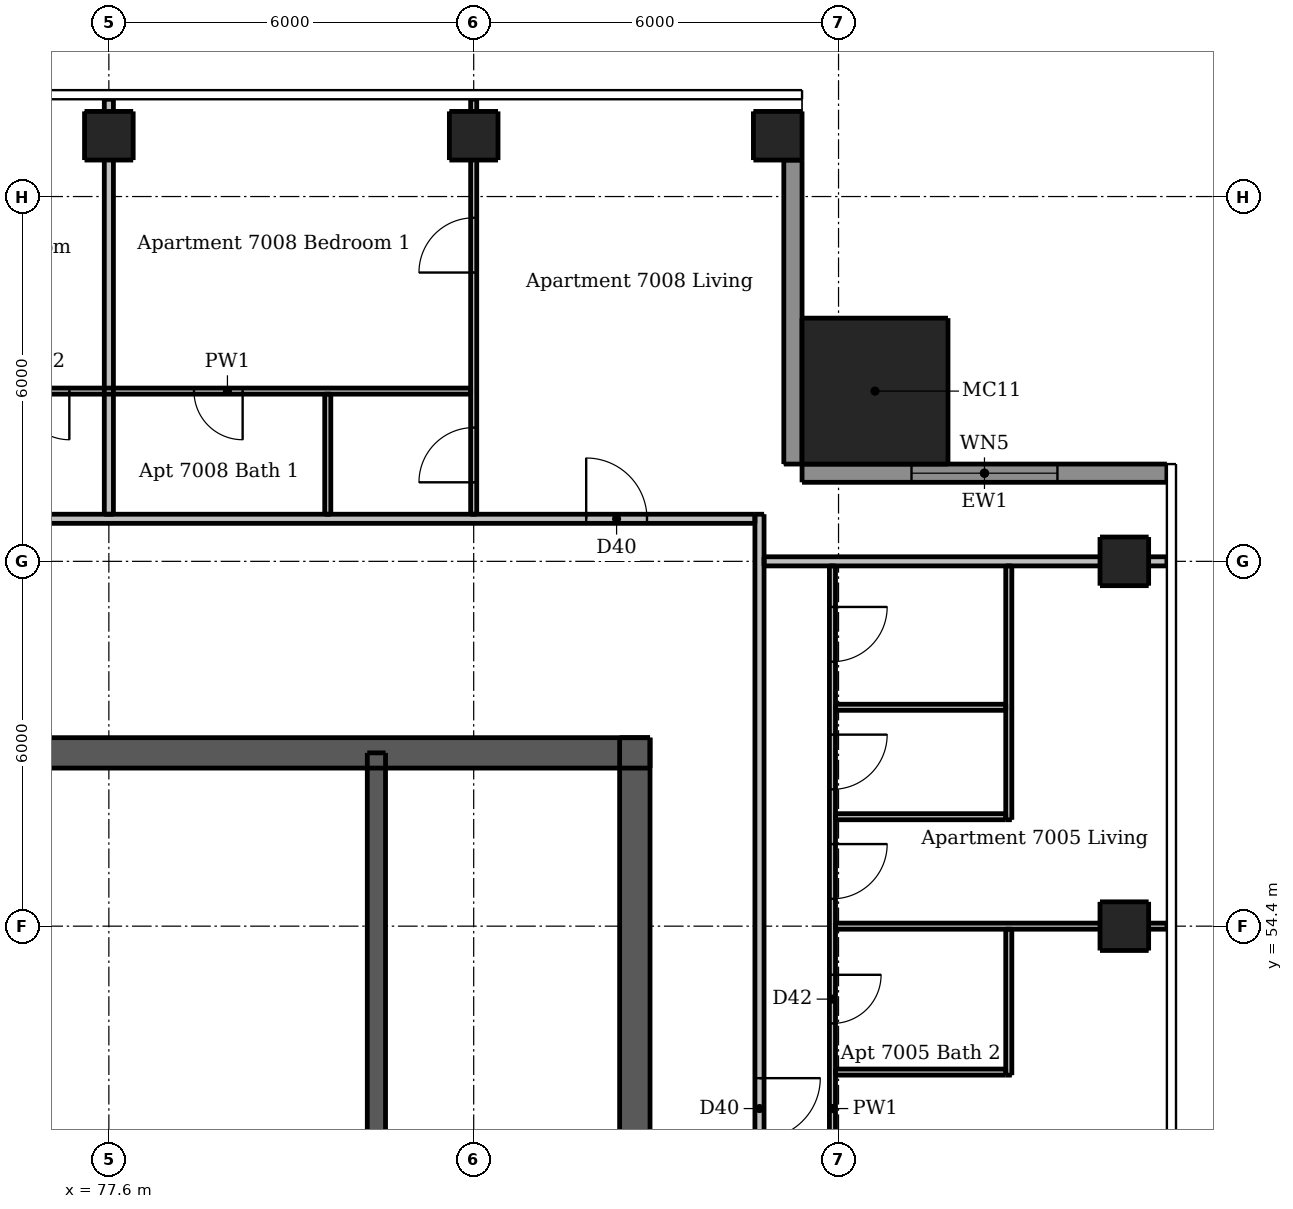
"""IFC4 building model, lengths in metres.
Left out: names, types, materials, properties, quantities, classifications, styles, units other than length and angle.
Written with IfcOpenShell. Run it as: python <this file> out.ifc"""

import sys

from ifc_helpers import new_model, si_unit, direction, frame, frame_2d, origin, origin_2d, place, context, subcontext, project, spatial, rectangle, extrude, element, fill, save


model = new_model("IFC4")
c1 = context("Model", 3, precision=1e-05, world=origin(), true_north=direction((0.0, 1.0)))
c2 = subcontext(c1, "Body", "Model", "MODEL_VIEW")
j1 = project(units=[si_unit("LENGTHUNIT", "METRE"), si_unit("PLANEANGLEUNIT", "RADIAN")], contexts=[c1])
p1 = place(None, origin())
s1 = spatial("IfcSite", under=j1, at=p1, CompositionType="ELEMENT")
p2 = place(p1, origin())
s2 = spatial("IfcBuilding", under=s1, at=p2, CompositionType="ELEMENT")
p3 = place(p2, frame((0.0, 0.0, 262.0)))
s3 = spatial("IfcBuildingStorey", under=s2, at=p3, CompositionType="ELEMENT", Elevation=262.0)
p4 = place(p3, frame((62.5, 57.25, 0.0), z_axis=(0.0, 0.0, 1.0), x_axis=(1.0, 0.0, 0.0)))
e1 = element("IfcWall", 1, at=p4, inside=s3, PredefinedType="SHEAR", context=c2, shape_type="SweptSolid", body=[
    extrude(rectangle(XDim=24.0, YDim=0.5, at=frame_2d((12.0, 0.0))), origin(), (0.0, 0.0, 1.0), 3.05),
])
p5 = place(p4, frame((21.025, 0.0, 0.0)))
e2 = element("IfcOpeningElement", 2, at=p5, cuts=e1, PredefinedType="OPENING", context=c2, shape_type="SweptSolid", body=[
    extrude(rectangle(XDim=1.1, YDim=2.1, at=frame_2d((0.55, 1.05))), frame((0.0, 0.26, 0.0), z_axis=(0.0, -1.0, 0.0), x_axis=(1.0, 0.0, 0.0)), (0.0, 0.0, 1.0), 0.52),
])
p6 = place(p4, frame((1.875, 0.0, 0.0)))
e3 = element("IfcOpeningElement", 3, at=p6, cuts=e1, PredefinedType="OPENING", context=c2, shape_type="SweptSolid", body=[
    extrude(rectangle(XDim=1.1, YDim=2.1, at=frame_2d((0.55, 1.05))), frame((0.0, 0.26, 0.0), z_axis=(0.0, -1.0, 0.0), x_axis=(1.0, 0.0, 0.0)), (0.0, 0.0, 1.0), 0.52),
])
p7 = place(p4, frame((11.55, 0.0, 0.0)))
e4 = element("IfcOpeningElement", 4, at=p7, cuts=e1, PredefinedType="OPENING", context=c2, shape_type="SweptSolid", body=[
    extrude(rectangle(XDim=0.9, YDim=2.1, at=frame_2d((0.45, 1.05))), frame((0.0, 0.26, 0.0), z_axis=(0.0, -1.0, 0.0), x_axis=(1.0, 0.0, 0.0)), (0.0, 0.0, 1.0), 0.52),
])
p8 = place(p3, frame((86.25, 33.5, 0.0), z_axis=(0.0, 0.0, 1.0), x_axis=(0.0, 1.0, 0.0)))
e5 = element("IfcWall", 5, at=p8, inside=s3, PredefinedType="SHEAR", context=c2, shape_type="SweptSolid", body=[
    extrude(rectangle(XDim=24.0, YDim=0.5, at=frame_2d((12.0, 0.0))), origin(), (0.0, 0.0, 1.0), 3.05),
])
p9 = place(p8, frame((11.2, 0.0, 0.0)))
e6 = element("IfcOpeningElement", 6, at=p9, cuts=e5, PredefinedType="OPENING", context=c2, shape_type="SweptSolid", body=[
    extrude(rectangle(XDim=1.6, YDim=2.1, at=frame_2d((0.8, 1.05))), frame((0.0, 0.26, 0.0), z_axis=(0.0, -1.0, 0.0), x_axis=(1.0, 0.0, 0.0)), (0.0, 0.0, 1.0), 0.52),
])
p10 = place(p3, frame((82.0, 47.1, 0.0), z_axis=(0.0, 0.0, 1.0), x_axis=(0.0, 1.0, 0.0)))
e7 = element("IfcWall", 7, at=p10, inside=s3, PredefinedType="SHEAR", context=c2, shape_type="SweptSolid", body=[
    extrude(rectangle(XDim=10.15, YDim=0.3, at=frame_2d((5.075, 0.0))), origin(), (0.0, 0.0, 1.0), 3.05),
])
for number, where, z_axis, x_axis in (
    (8, (94.3, 54.4, 0.0), (0.0, 0.0, 1.0), (1.0, 0.0, 0.0)),
    (9, (94.3, 60.4, 0.0), (0.0, 0.0, 1.0), (1.0, 0.0, 0.0)),
    (10, (77.6, 67.4, 0.0), (0.0, 0.0, 1.0), (1.0, 0.0, 0.0)),
    (11, (83.6, 67.4, 0.0), (0.0, 0.0, 1.0), (1.0, 0.0, 0.0)),
    (12, (88.6, 67.4, 0.0), (0.0, 0.0, 1.0), (1.0, 0.0, 0.0)),
):
    element("IfcColumn", number, at=place(p3, frame(where, z_axis=z_axis, x_axis=x_axis)), inside=s3, PredefinedType="COLUMN", context=c2, shape_type="SweptSolid", body=[
        extrude(rectangle(XDim=0.8, YDim=0.8, at=origin_2d()), origin(), (0.0, 0.0, 1.0), 3.05),
    ])
p11 = place(p3, frame((90.2, 63.2, 0.0), z_axis=(0.0, 0.0, 1.0), x_axis=(1.0, 0.0, 0.0)))
e13 = element("IfcColumn", 13, at=p11, inside=s3, PredefinedType="COLUMN", context=c2, shape_type="SweptSolid", body=[
    extrude(rectangle(XDim=2.4, YDim=2.4, at=origin_2d()), origin(), (0.0, 0.0, 1.0), 3.3),
])
p12 = place(p3, frame((95.0, 61.85, 0.0), z_axis=(0.0, 0.0, 1.0), x_axis=(-1.0, 0.0, 0.0)))
e14 = element("IfcWall", 14, at=p12, inside=s3, PredefinedType="SOLIDWALL", context=c2, shape_type="SweptSolid", body=[
    extrude(rectangle(XDim=6.0, YDim=0.3, at=frame_2d((3.0, 0.0))), origin(), (0.0, 0.0, 1.0), 3.05),
])
p13 = place(p12, frame((1.8, 0.0, 0.15)))
e15 = element("IfcOpeningElement", 15, at=p13, cuts=e14, PredefinedType="OPENING", context=c2, shape_type="SweptSolid", body=[
    extrude(rectangle(XDim=2.4, YDim=2.1, at=frame_2d((1.2, 1.05))), frame((0.0, 0.16, 0.0), z_axis=(0.0, -1.0, 0.0), x_axis=(1.0, 0.0, 0.0)), (0.0, 0.0, 1.0), 0.32),
])
p14 = place(p3, frame((88.85, 62.0, 0.0), z_axis=(0.0, 0.0, 1.0), x_axis=(0.0, 1.0, 0.0)))
e16 = element("IfcWall", 16, at=p14, inside=s3, PredefinedType="SOLIDWALL", context=c2, shape_type="SweptSolid", body=[
    extrude(rectangle(XDim=5.0, YDim=0.3, at=frame_2d((2.5, 0.0))), origin(), (0.0, 0.0, 1.0), 3.05),
])
p15 = place(p3, frame((81.2, 61.175, 0.0), z_axis=(0.0, 0.0, 1.0), x_axis=(0.0, 1.0, 0.0)))
e17 = element("IfcWall", 17, at=p15, inside=s3, PredefinedType="PARTITIONING", context=c2, shape_type="SweptSolid", body=[
    extrude(rectangle(XDim=1.975, YDim=0.1, at=frame_2d((0.987, 0.0))), origin(), (0.0, 0.0, 1.0), 3.05),
])
p16 = place(p3, frame((83.6, 61.175, 0.0), z_axis=(0.0, 0.0, 1.0), x_axis=(0.0, 1.0, 0.0)))
e18 = element("IfcWall", 18, at=p16, inside=s3, PredefinedType="PARTITIONING", context=c2, shape_type="SweptSolid", body=[
    extrude(rectangle(XDim=6.825, YDim=0.1, at=frame_2d((3.413, 0.0))), origin(), (0.0, 0.0, 1.0), 2.516),
])
p17 = place(p16, frame((0.525, 0.0, 0.0)))
e19 = element("IfcOpeningElement", 19, at=p17, cuts=e18, PredefinedType="OPENING", context=c2, shape_type="SweptSolid", body=[
    extrude(rectangle(XDim=0.9, YDim=2.1, at=frame_2d((0.45, 1.05))), frame((0.0, 0.06, 0.0), z_axis=(0.0, -1.0, 0.0), x_axis=(1.0, 0.0, 0.0)), (0.0, 0.0, 1.0), 0.12),
])
p18 = place(p16, frame((3.975, 0.0, 0.0)))
e20 = element("IfcOpeningElement", 20, at=p18, cuts=e18, PredefinedType="OPENING", context=c2, shape_type="SweptSolid", body=[
    extrude(rectangle(XDim=0.9, YDim=2.1, at=frame_2d((0.45, 1.05))), frame((0.0, 0.06, 0.0), z_axis=(0.0, -1.0, 0.0), x_axis=(1.0, 0.0, 0.0)), (0.0, 0.0, 1.0), 0.12),
])
p19 = place(p3, frame((89.5, 60.325, 0.0), z_axis=(0.0, 0.0, 1.0), x_axis=(0.0, -1.0, 0.0)))
e21 = element("IfcWall", 21, at=p19, inside=s3, PredefinedType="PARTITIONING", context=c2, shape_type="SweptSolid", body=[
    extrude(rectangle(XDim=17.85, YDim=0.1, at=frame_2d((8.925, 0.0))), origin(), (0.0, 0.0, 1.0), 3.05),
])
p20 = place(p19, frame((4.575, 0.0, 0.0)))
e22 = element("IfcOpeningElement", 22, at=p20, cuts=e21, PredefinedType="OPENING", context=c2, shape_type="SweptSolid", body=[
    extrude(rectangle(XDim=0.9, YDim=2.1, at=frame_2d((0.45, 1.05))), frame((0.0, 0.06, 0.0), z_axis=(0.0, -1.0, 0.0), x_axis=(1.0, 0.0, 0.0)), (0.0, 0.0, 1.0), 0.12),
])
p21 = place(p19, frame((0.675, 0.0, 0.0)))
e23 = element("IfcOpeningElement", 23, at=p21, cuts=e21, PredefinedType="OPENING", context=c2, shape_type="SweptSolid", body=[
    extrude(rectangle(XDim=0.9, YDim=2.1, at=frame_2d((0.45, 1.05))), frame((0.0, 0.06, 0.0), z_axis=(0.0, -1.0, 0.0), x_axis=(1.0, 0.0, 0.0)), (0.0, 0.0, 1.0), 0.12),
])
p22 = place(p19, frame((2.775, 0.0, 0.0)))
e24 = element("IfcOpeningElement", 24, at=p22, cuts=e21, PredefinedType="OPENING", context=c2, shape_type="SweptSolid", body=[
    extrude(rectangle(XDim=0.9, YDim=2.1, at=frame_2d((0.45, 1.05))), frame((0.0, 0.06, 0.0), z_axis=(0.0, -1.0, 0.0), x_axis=(1.0, 0.0, 0.0)), (0.0, 0.0, 1.0), 0.12),
])
p23 = place(p19, frame((15.675, 0.0, 0.0)))
e25 = element("IfcOpeningElement", 25, at=p23, cuts=e21, PredefinedType="OPENING", context=c2, shape_type="SweptSolid", body=[
    extrude(rectangle(XDim=0.9, YDim=2.1, at=frame_2d((0.45, 1.05))), frame((0.0, 0.06, 0.0), z_axis=(0.0, -1.0, 0.0), x_axis=(1.0, 0.0, 0.0)), (0.0, 0.0, 1.0), 0.12),
])
p24 = place(p19, frame((9.675, 0.0, 0.0)))
e26 = element("IfcOpeningElement", 26, at=p24, cuts=e21, PredefinedType="OPENING", context=c2, shape_type="SweptSolid", body=[
    extrude(rectangle(XDim=0.9, YDim=2.1, at=frame_2d((0.45, 1.05))), frame((0.0, 0.06, 0.0), z_axis=(0.0, -1.0, 0.0), x_axis=(1.0, 0.0, 0.0)), (0.0, 0.0, 1.0), 0.12),
])
p25 = place(p19, frame((12.725, 0.0, 0.0)))
e27 = element("IfcOpeningElement", 27, at=p25, cuts=e21, PredefinedType="OPENING", context=c2, shape_type="SweptSolid", body=[
    extrude(rectangle(XDim=0.8, YDim=2.1, at=frame_2d((0.4, 1.05))), frame((0.0, 0.06, 0.0), z_axis=(0.0, -1.0, 0.0), x_axis=(1.0, 0.0, 0.0)), (0.0, 0.0, 1.0), 0.12),
])
p26 = place(p19, frame((6.725, 0.0, 0.0)))
e28 = element("IfcOpeningElement", 28, at=p26, cuts=e21, PredefinedType="OPENING", context=c2, shape_type="SweptSolid", body=[
    extrude(rectangle(XDim=0.8, YDim=2.1, at=frame_2d((0.4, 1.05))), frame((0.0, 0.06, 0.0), z_axis=(0.0, -1.0, 0.0), x_axis=(1.0, 0.0, 0.0)), (0.0, 0.0, 1.0), 0.12),
])
p27 = place(p3, frame((92.4, 51.95, 0.0), z_axis=(0.0, 0.0, 1.0), x_axis=(0.0, 1.0, 0.0)))
e29 = element("IfcWall", 29, at=p27, inside=s3, PredefinedType="PARTITIONING", context=c2, shape_type="SweptSolid", body=[
    extrude(rectangle(XDim=2.4, YDim=0.1, at=frame_2d((1.2, 0.0))), origin(), (0.0, 0.0, 1.0), 3.05),
])
p28 = place(p3, frame((92.4, 56.15, 0.0), z_axis=(0.0, 0.0, 1.0), x_axis=(0.0, 1.0, 0.0)))
e30 = element("IfcWall", 30, at=p28, inside=s3, PredefinedType="PARTITIONING", context=c2, shape_type="SweptSolid", body=[
    extrude(rectangle(XDim=4.175, YDim=0.1, at=frame_2d((2.087, 0.0))), origin(), (0.0, 0.0, 1.0), 3.05),
])
p29 = place(p3, frame((83.55, 63.2, 0.0), z_axis=(0.0, 0.0, 1.0), x_axis=(-1.0, 0.0, 0.0)))
e31 = element("IfcWall", 31, at=p29, inside=s3, PredefinedType="PARTITIONING", context=c2, shape_type="SweptSolid", body=[
    extrude(rectangle(XDim=8.0, YDim=0.1, at=frame_2d((4.0, 0.0))), origin(), (0.0, 0.0, 1.0), 3.05),
])
p30 = place(p29, frame((6.6, 0.0, 0.0)))
e32 = element("IfcOpeningElement", 32, at=p30, cuts=e31, PredefinedType="OPENING", context=c2, shape_type="SweptSolid", body=[
    extrude(rectangle(XDim=0.8, YDim=2.1, at=frame_2d((0.4, 1.05))), frame((0.0, 0.06, 0.0), z_axis=(0.0, -1.0, 0.0), x_axis=(1.0, 0.0, 0.0)), (0.0, 0.0, 1.0), 0.12),
])
p31 = place(p29, frame((3.75, 0.0, 0.0)))
e33 = element("IfcOpeningElement", 33, at=p31, cuts=e31, PredefinedType="OPENING", context=c2, shape_type="SweptSolid", body=[
    extrude(rectangle(XDim=0.8, YDim=2.1, at=frame_2d((0.4, 1.05))), frame((0.0, 0.06, 0.0), z_axis=(0.0, -1.0, 0.0), x_axis=(1.0, 0.0, 0.0)), (0.0, 0.0, 1.0), 0.12),
])
for number, where, z_axis, x_axis in (
    (34, (89.55, 58.0, 0.0), (0.0, 0.0, 1.0), (1.0, 0.0, 0.0)),
    (35, (89.55, 56.2, 0.0), (0.0, 0.0, 1.0), (1.0, 0.0, 0.0)),
):
    element("IfcWall", number, at=place(p3, frame(where, z_axis=z_axis, x_axis=x_axis)), inside=s3, PredefinedType="PARTITIONING", context=c2, shape_type="SweptSolid", body=[
        extrude(rectangle(XDim=2.8, YDim=0.1, at=frame_2d((1.4, 0.0))), origin(), (0.0, 0.0, 1.0), 3.05),
    ])
p32 = place(p3, frame((89.55, 54.4, 0.0), z_axis=(0.0, 0.0, 1.0), x_axis=(1.0, 0.0, 0.0)))
e36 = element("IfcWall", 36, at=p32, inside=s3, PredefinedType="PARTITIONING", context=c2, shape_type="SweptSolid", body=[
    extrude(rectangle(XDim=5.45, YDim=0.1, at=frame_2d((2.725, 0.0))), origin(), (0.0, 0.0, 1.0), 2.59),
])
p33 = place(p3, frame((89.55, 52.0, 0.0), z_axis=(0.0, 0.0, 1.0), x_axis=(1.0, 0.0, 0.0)))
e37 = element("IfcWall", 37, at=p33, inside=s3, PredefinedType="PARTITIONING", context=c2, shape_type="SweptSolid", body=[
    extrude(rectangle(XDim=2.8, YDim=0.1, at=frame_2d((1.4, 0.0))), origin(), (0.0, 0.0, 1.0), 3.05),
])
p34 = place(p3, frame((77.6, 61.175, 0.0), z_axis=(0.0, 0.0, 1.0), x_axis=(0.0, 1.0, 0.0)))
e38 = element("IfcWall", 38, at=p34, inside=s3, PredefinedType="PARTITIONING", context=c2, shape_type="SweptSolid", body=[
    extrude(rectangle(XDim=6.825, YDim=0.15, at=frame_2d((3.413, 0.0))), origin(), (0.0, 0.0, 1.0), 2.516),
])
p35 = place(p3, frame((88.3, 61.175, 0.0), z_axis=(0.0, 0.0, 1.0), x_axis=(0.0, -1.0, 0.0)))
e39 = element("IfcWall", 39, at=p35, inside=s3, PredefinedType="PARTITIONING", context=c2, shape_type="SweptSolid", body=[
    extrude(rectangle(XDim=29.4, YDim=0.15, at=frame_2d((14.7, 0.0))), origin(), (0.0, 0.0, 1.0), 3.05),
])
p36 = place(p35, frame((26.625, 0.0, 0.0)))
e40 = element("IfcOpeningElement", 40, at=p36, cuts=e39, PredefinedType="OPENING", context=c2, shape_type="SweptSolid", body=[
    extrude(rectangle(XDim=1.0, YDim=2.1, at=frame_2d((0.5, 1.05))), frame((0.0, 0.085, 0.0), z_axis=(0.0, -1.0, 0.0), x_axis=(1.0, 0.0, 0.0)), (0.0, 0.0, 1.0), 0.17),
])
p37 = place(p35, frame((9.275, 0.0, 0.0)))
e41 = element("IfcOpeningElement", 41, at=p37, cuts=e39, PredefinedType="OPENING", context=c2, shape_type="SweptSolid", body=[
    extrude(rectangle(XDim=1.0, YDim=2.1, at=frame_2d((0.5, 1.05))), frame((0.0, 0.085, 0.0), z_axis=(0.0, -1.0, 0.0), x_axis=(1.0, 0.0, 0.0)), (0.0, 0.0, 1.0), 0.17),
])
p38 = place(p3, frame((58.975, 61.1, 0.0), z_axis=(0.0, 0.0, 1.0), x_axis=(1.0, 0.0, 0.0)))
e42 = element("IfcWall", 42, at=p38, inside=s3, PredefinedType="PARTITIONING", context=c2, shape_type="SweptSolid", body=[
    extrude(rectangle(XDim=29.25, YDim=0.15, at=frame_2d((14.625, 0.0))), origin(), (0.0, 0.0, 1.0), 3.05),
])
p39 = place(p38, frame((4.325, 0.0, 0.0)))
e43 = element("IfcOpeningElement", 43, at=p39, cuts=e42, PredefinedType="OPENING", context=c2, shape_type="SweptSolid", body=[
    extrude(rectangle(XDim=1.0, YDim=2.1, at=frame_2d((0.5, 1.05))), frame((0.0, 0.085, 0.0), z_axis=(0.0, -1.0, 0.0), x_axis=(1.0, 0.0, 0.0)), (0.0, 0.0, 1.0), 0.17),
])
p40 = place(p38, frame((15.125, 0.0, 0.0)))
e44 = element("IfcOpeningElement", 44, at=p40, cuts=e42, PredefinedType="OPENING", context=c2, shape_type="SweptSolid", body=[
    extrude(rectangle(XDim=1.0, YDim=2.1, at=frame_2d((0.5, 1.05))), frame((0.0, 0.085, 0.0), z_axis=(0.0, -1.0, 0.0), x_axis=(1.0, 0.0, 0.0)), (0.0, 0.0, 1.0), 0.17),
])
p41 = place(p38, frame((26.475, 0.0, 0.0)))
e45 = element("IfcOpeningElement", 45, at=p41, cuts=e42, PredefinedType="OPENING", context=c2, shape_type="SweptSolid", body=[
    extrude(rectangle(XDim=1.0, YDim=2.1, at=frame_2d((0.5, 1.05))), frame((0.0, 0.085, 0.0), z_axis=(0.0, -1.0, 0.0), x_axis=(1.0, 0.0, 0.0)), (0.0, 0.0, 1.0), 0.17),
])
p42 = place(p3, frame((88.375, 60.4, 0.0), z_axis=(0.0, 0.0, 1.0), x_axis=(1.0, 0.0, 0.0)))
e46 = element("IfcWall", 46, at=p42, inside=s3, PredefinedType="PARTITIONING", context=c2, shape_type="SweptSolid", body=[
    extrude(rectangle(XDim=6.625, YDim=0.15, at=frame_2d((3.312, 0.0))), origin(), (0.0, 0.0, 1.0), 2.647),
])
p43 = place(p13, origin())
e47 = element("IfcWindow", 47, at=p43, inside=s3, PartitioningType="DOUBLE_PANEL_VERTICAL", PredefinedType="WINDOW", context=c2, shape_type="SweptSolid", body=[
    extrude(rectangle(XDim=2.4, YDim=2.1, at=frame_2d((1.2, 1.05))), frame((0.0, 0.03, 0.0), z_axis=(0.0, -1.0, 0.0), x_axis=(1.0, 0.0, 0.0)), (0.0, 0.0, 1.0), 0.06),
])
fill(e15, e47)
p44 = place(p5, origin())
e48 = element("IfcDoor", 48, at=p44, inside=s3, OperationType="SINGLE_SWING_RIGHT", PredefinedType="DOOR", context=c2, shape_type="SweptSolid", body=[
    extrude(rectangle(XDim=1.1, YDim=2.1, at=frame_2d((0.55, 1.05))), frame((0.0, -0.188, 0.0), z_axis=(0.0, -1.0, 0.0), x_axis=(1.0, 0.0, 0.0)), (0.0, 0.0, 1.0), 0.05),
])
fill(e2, e48)
p45 = place(p37, origin())
e49 = element("IfcDoor", 49, at=p45, inside=s3, OperationType="SINGLE_SWING_LEFT", PredefinedType="DOOR", context=c2, shape_type="SweptSolid", body=[
    extrude(rectangle(XDim=1.0, YDim=2.1, at=frame_2d((0.5, 1.05))), frame((0.0, 0.025, 0.0), z_axis=(0.0, -1.0, 0.0), x_axis=(1.0, 0.0, 0.0)), (0.0, 0.0, 1.0), 0.05),
])
fill(e41, e49)
p46 = place(p20, origin())
e50 = element("IfcDoor", 50, at=p46, inside=s3, OperationType="SINGLE_SWING_LEFT", PredefinedType="DOOR", context=c2, shape_type="SweptSolid", body=[
    extrude(rectangle(XDim=0.9, YDim=2.1, at=frame_2d((0.45, 1.05))), frame((0.0, 0.025, 0.0), z_axis=(0.0, -1.0, 0.0), x_axis=(1.0, 0.0, 0.0)), (0.0, 0.0, 1.0), 0.05),
])
fill(e22, e50)
p47 = place(p21, origin())
e51 = element("IfcDoor", 51, at=p47, inside=s3, OperationType="SINGLE_SWING_LEFT", PredefinedType="DOOR", context=c2, shape_type="SweptSolid", body=[
    extrude(rectangle(XDim=0.9, YDim=2.1, at=frame_2d((0.45, 1.05))), frame((0.0, 0.025, 0.0), z_axis=(0.0, -1.0, 0.0), x_axis=(1.0, 0.0, 0.0)), (0.0, 0.0, 1.0), 0.05),
])
fill(e23, e51)
p48 = place(p22, origin())
e52 = element("IfcDoor", 52, at=p48, inside=s3, OperationType="SINGLE_SWING_LEFT", PredefinedType="DOOR", context=c2, shape_type="SweptSolid", body=[
    extrude(rectangle(XDim=0.9, YDim=2.1, at=frame_2d((0.45, 1.05))), frame((0.0, 0.025, 0.0), z_axis=(0.0, -1.0, 0.0), x_axis=(1.0, 0.0, 0.0)), (0.0, 0.0, 1.0), 0.05),
])
fill(e24, e52)
p49 = place(p26, origin())
e53 = element("IfcDoor", 53, at=p49, inside=s3, OperationType="SINGLE_SWING_LEFT", PredefinedType="DOOR", context=c2, shape_type="SweptSolid", body=[
    extrude(rectangle(XDim=0.8, YDim=2.1, at=frame_2d((0.4, 1.05))), frame((0.0, 0.025, 0.0), z_axis=(0.0, -1.0, 0.0), x_axis=(1.0, 0.0, 0.0)), (0.0, 0.0, 1.0), 0.05),
])
fill(e28, e53)
p50 = place(p30, origin())
e54 = element("IfcDoor", 54, at=p50, inside=s3, OperationType="SINGLE_SWING_LEFT", PredefinedType="DOOR", context=c2, shape_type="SweptSolid", body=[
    extrude(rectangle(XDim=0.8, YDim=2.1, at=frame_2d((0.4, 1.05))), frame((0.0, 0.025, 0.0), z_axis=(0.0, -1.0, 0.0), x_axis=(1.0, 0.0, 0.0)), (0.0, 0.0, 1.0), 0.05),
])
fill(e32, e54)
p51 = place(p41, origin())
e55 = element("IfcDoor", 55, at=p51, inside=s3, OperationType="SINGLE_SWING_LEFT", PredefinedType="DOOR", context=c2, shape_type="SweptSolid", body=[
    extrude(rectangle(XDim=1.0, YDim=2.1, at=frame_2d((0.5, 1.05))), frame((0.0, 0.025, 0.0), z_axis=(0.0, -1.0, 0.0), x_axis=(1.0, 0.0, 0.0)), (0.0, 0.0, 1.0), 0.05),
])
fill(e45, e55)
p52 = place(p17, origin())
e56 = element("IfcDoor", 56, at=p52, inside=s3, OperationType="SINGLE_SWING_LEFT", PredefinedType="DOOR", context=c2, shape_type="SweptSolid", body=[
    extrude(rectangle(XDim=0.9, YDim=2.1, at=frame_2d((0.45, 1.05))), frame((0.0, 0.025, 0.0), z_axis=(0.0, -1.0, 0.0), x_axis=(1.0, 0.0, 0.0)), (0.0, 0.0, 1.0), 0.05),
])
fill(e19, e56)
p53 = place(p18, origin())
e57 = element("IfcDoor", 57, at=p53, inside=s3, OperationType="SINGLE_SWING_LEFT", PredefinedType="DOOR", context=c2, shape_type="SweptSolid", body=[
    extrude(rectangle(XDim=0.9, YDim=2.1, at=frame_2d((0.45, 1.05))), frame((0.0, 0.025, 0.0), z_axis=(0.0, -1.0, 0.0), x_axis=(1.0, 0.0, 0.0)), (0.0, 0.0, 1.0), 0.05),
])
fill(e20, e57)
p54 = place(p31, origin())
e58 = element("IfcDoor", 58, at=p54, inside=s3, OperationType="SINGLE_SWING_LEFT", PredefinedType="DOOR", context=c2, shape_type="SweptSolid", body=[
    extrude(rectangle(XDim=0.8, YDim=2.1, at=frame_2d((0.4, 1.05))), frame((0.0, 0.025, 0.0), z_axis=(0.0, -1.0, 0.0), x_axis=(1.0, 0.0, 0.0)), (0.0, 0.0, 1.0), 0.05),
])
fill(e33, e58)
save(model, sys.argv[1])
